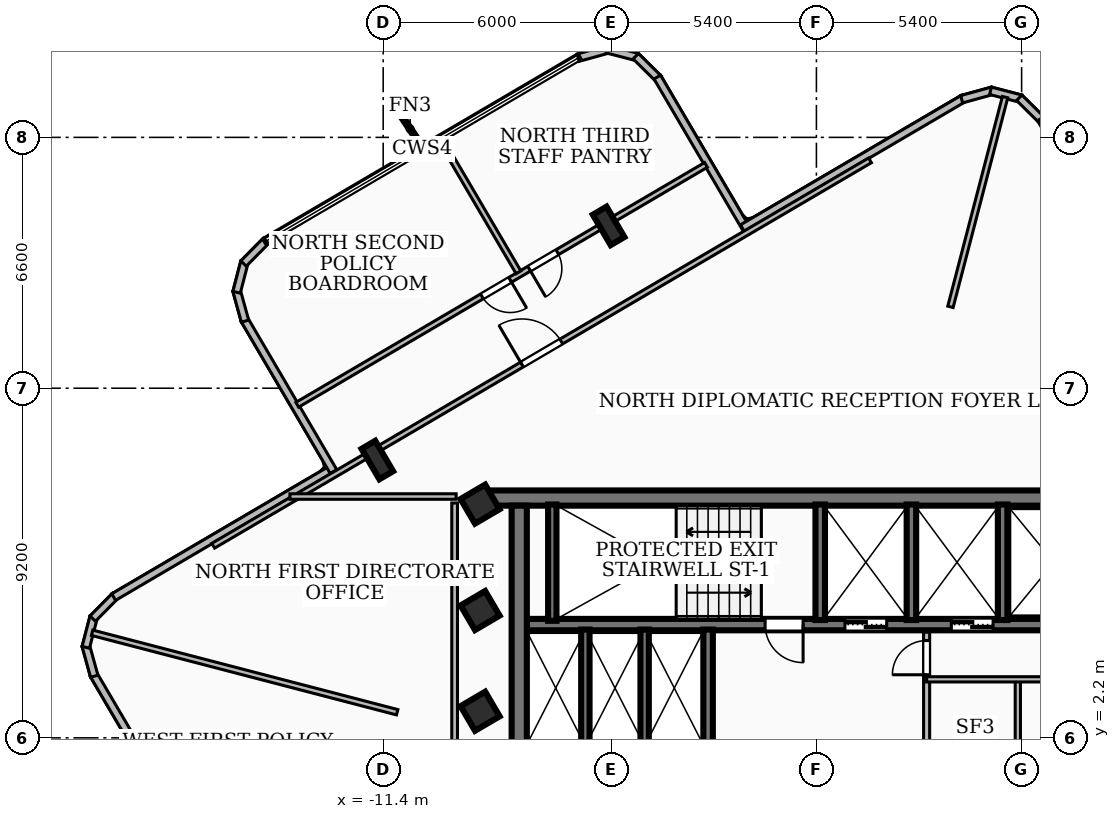
"""IFC4 building model, lengths in metres.
Left out: names, types, materials, properties, quantities, classifications, styles, units other than length and angle.
Written with IfcOpenShell. Run it as: python <this file> out.ifc"""

import sys

from ifc_helpers import new_model, si_unit, direction, frame, frame_2d, origin, origin_2d, place, context, subcontext, project, spatial, rectangle, i_section, extrude, element, fill, save


model = new_model("IFC4")
c1 = context("Model", 3, precision=1e-05, world=origin(), true_north=direction((0.0, 1.0)))
c2 = subcontext(c1, "Body", "Model", "MODEL_VIEW")
j1 = project(units=[si_unit("LENGTHUNIT", "METRE"), si_unit("PLANEANGLEUNIT", "RADIAN")], contexts=[c1])
p1 = place(None, origin())
s1 = spatial("IfcSite", under=j1, at=p1, CompositionType="ELEMENT")
p2 = place(p1, origin())
s2 = spatial("IfcBuilding", under=s1, at=p2, CompositionType="ELEMENT")
p3 = place(p2, frame((0.0, 0.0, 205.2)))
s3 = spatial("IfcBuildingStorey", under=s2, at=p3, CompositionType="ELEMENT", Elevation=205.2)
p4 = place(p3, frame((-8.78, 8.51, 0.0), z_axis=(0.0, 0.0, 1.0), x_axis=(1.0, 0.0, 0.0)))
e1 = element("IfcWall", 1, at=p4, inside=s3, PredefinedType="SHEAR", context=c2, shape_type="SweptSolid", body=[
    extrude(rectangle(XDim=17.56, YDim=0.4, at=frame_2d((8.78, 0.0))), origin(), (0.0, 0.0, 1.0), 3.16),
])
p5 = place(p3, frame((-7.82, 1.95, 0.0), z_axis=(0.0, 0.0, 1.0), x_axis=(0.0, 1.0, 0.0)))
e2 = element("IfcWall", 2, at=p5, inside=s3, PredefinedType="SHEAR", context=c2, shape_type="SweptSolid", body=[
    extrude(rectangle(XDim=6.36, YDim=0.4, at=frame_2d((3.18, 0.0))), origin(), (0.0, 0.0, 1.0), 3.16),
])
p6 = place(p3, frame((7.62, 5.18, 0.0), z_axis=(0.0, 0.0, 1.0), x_axis=(-1.0, 0.0, 0.0)))
e3 = element("IfcWall", 3, at=p6, inside=s3, PredefinedType="SOLIDWALL", context=c2, shape_type="SweptSolid", body=[
    extrude(rectangle(XDim=15.24, YDim=0.3, at=frame_2d((7.62, 0.0))), origin(), (0.0, 0.0, 1.0), 3.16),
])
p7 = place(p6, frame((5.77, 0.0, 0.0)))
e4 = element("IfcOpeningElement", 4, at=p7, cuts=e3, PredefinedType="OPENING", context=c2, shape_type="SweptSolid", body=[
    extrude(rectangle(XDim=1.1, YDim=2.15, at=frame_2d((0.55, 1.075))), frame((0.0, 0.16, 0.0), z_axis=(0.0, -1.0, 0.0), x_axis=(1.0, 0.0, 0.0)), (0.0, 0.0, 1.0), 0.32),
])
p8 = place(p6, frame((2.97, 0.0, 0.0)))
e5 = element("IfcOpeningElement", 5, at=p8, cuts=e3, PredefinedType="OPENING", context=c2, shape_type="SweptSolid", body=[
    extrude(rectangle(XDim=1.1, YDim=2.15, at=frame_2d((0.55, 1.075))), frame((0.0, 0.16, 0.0), z_axis=(0.0, -1.0, 0.0), x_axis=(1.0, 0.0, 0.0)), (0.0, 0.0, 1.0), 0.32),
])
p9 = place(p6, frame((7.97, 0.0, 0.0)))
e6 = element("IfcOpeningElement", 6, at=p9, cuts=e3, PredefinedType="OPENING", context=c2, shape_type="SweptSolid", body=[
    extrude(rectangle(XDim=1.0, YDim=2.1, at=frame_2d((0.5, 1.05))), frame((0.0, 0.16, 0.0), z_axis=(0.0, -1.0, 0.0), x_axis=(1.0, 0.0, 0.0)), (0.0, 0.0, 1.0), 0.32),
])
p10 = place(p3, frame((-6.95, 5.28, 0.0), z_axis=(0.0, 0.0, 1.0), x_axis=(0.0, 1.0, 0.0)))
e7 = element("IfcWall", 7, at=p10, inside=s3, PredefinedType="SOLIDWALL", context=c2, shape_type="SweptSolid", body=[
    extrude(rectangle(XDim=3.06, YDim=0.22, at=frame_2d((1.53, 0.0))), origin(), (0.0, 0.0, 1.0), 3.16),
])
for number, where, z_axis, x_axis in (
    (8, (0.1, 5.3, 0.0), (0.0, 0.0, 1.0), (0.0, 1.0, 0.0)),
    (9, (2.5, 5.3, 0.0), (0.0, 0.0, 1.0), (0.0, 1.0, 0.0)),
    (10, (4.9, 5.3, 0.0), (0.0, 0.0, 1.0), (0.0, 1.0, 0.0)),
):
    element("IfcWall", number, at=place(p3, frame(where, z_axis=z_axis, x_axis=x_axis)), inside=s3, PredefinedType="SOLIDWALL", context=c2, shape_type="SweptSolid", body=[
        extrude(rectangle(XDim=3.04, YDim=0.25, at=frame_2d((1.52, 0.0))), origin(), (0.0, 0.0, 1.0), 3.16),
    ])
p11 = place(p3, frame((-2.85, 1.98, 0.0), z_axis=(0.0, 0.0, 1.0), x_axis=(0.0, 1.0, 0.0)))
e11 = element("IfcWall", 11, at=p11, inside=s3, PredefinedType="SOLIDWALL", context=c2, shape_type="SweptSolid", body=[
    extrude(rectangle(XDim=3.07, YDim=0.25, at=frame_2d((1.535, 0.0))), origin(), (0.0, 0.0, 1.0), 3.16),
])
for number, where, z_axis, x_axis in (
    (12, (-6.08, 1.98, 0.0), (0.0, 0.0, 1.0), (0.0, 1.0, 0.0)),
    (13, (-4.52, 1.98, 0.0), (0.0, 0.0, 1.0), (0.0, 1.0, 0.0)),
):
    element("IfcWall", number, at=place(p3, frame(where, z_axis=z_axis, x_axis=x_axis)), inside=s3, PredefinedType="SOLIDWALL", context=c2, shape_type="SweptSolid", body=[
        extrude(rectangle(XDim=3.07, YDim=0.22, at=frame_2d((1.535, 0.0))), origin(), (0.0, 0.0, 1.0), 3.16),
    ])
for number, where, z_axis, x_axis in (
    (14, (-8.85, 2.9, 0.0), (0.0, 0.0, 1.0), (0.863, 0.506, 0.0)),
    (15, (-8.85, 5.55, 0.0), (0.0, 0.0, 1.0), (0.863, 0.506, 0.0)),
    (16, (-8.85, 8.35, 0.0), (0.0, 0.0, 1.0), (0.863, 0.506, 0.0)),
):
    element("IfcColumn", number, at=place(p3, frame(where, z_axis=z_axis, x_axis=x_axis)), inside=s3, PredefinedType="COLUMN", context=c2, shape_type="SweptSolid", body=[
        extrude(rectangle(XDim=0.75, YDim=0.75, at=origin_2d()), origin(), (0.0, 0.0, 1.0), 3.42),
    ])
for number, where, z_axis, x_axis in (
    (17, (-5.468, 15.671, 0.0), (0.0, 0.0, 1.0), (0.863, 0.506, 0.0)),
    (18, (-11.554, 9.51, 0.0), (0.0, 0.0, 1.0), (0.863, 0.506, 0.0)),
):
    element("IfcColumn", number, at=place(p3, frame(where, z_axis=z_axis, x_axis=x_axis)), inside=s3, PredefinedType="COLUMN", context=c2, shape_type="SweptSolid", body=[
        extrude(i_section(OverallWidth=0.418, OverallDepth=0.927, WebThickness=0.019, FlangeThickness=0.032, at=origin_2d()), origin(), (0.0, 0.0, 1.0), 3.42),
    ])
p12 = place(p3, frame((-5.904, -18.492, 0.0), z_axis=(0.0, 0.0, 1.0), x_axis=(-0.506046465446, 0.862506217258, 0.0)))
e19 = element("IfcWall", 19, at=p12, inside=s3, PredefinedType="SOLIDWALL", context=c2, shape_type="SweptSolid", body=[
    extrude(rectangle(XDim=25.924, YDim=0.2, at=frame_2d((12.962, 0.0))), origin(), (0.0, 0.0, 1.0), 3.16),
])
p13 = place(p12, frame((0.85, 0.0, 0.85)))
e20 = element("IfcOpeningElement", 20, at=p13, cuts=e19, PredefinedType="OPENING", context=c2, shape_type="SweptSolid", body=[
    extrude(rectangle(XDim=1.8, YDim=2.0, at=frame_2d((0.9, 1.0))), frame((0.0, 0.11, 0.0), z_axis=(0.0, -1.0, 0.0), x_axis=(1.0, 0.0, 0.0)), (0.0, 0.0, 1.0), 0.22),
])
p14 = place(p3, frame((-19.003, 3.822, 0.0), z_axis=(0.0, 0.0, 1.0), x_axis=(-0.266246353668, 0.963905015631, 0.0)))
e21 = element("IfcWall", 21, at=p14, inside=s3, PredefinedType="SOLIDWALL", context=c2, shape_type="SweptSolid", body=[
    extrude(rectangle(XDim=0.838, YDim=0.2, at=frame_2d((0.419, 0.0))), origin(), (0.0, 0.0, 1.0), 3.16),
])
p15 = place(p3, frame((-19.225, 4.582, 0.0), z_axis=(0.0, 0.0, 1.0), x_axis=(0.251167733737, 0.967943577658, 0.0)))
e22 = element("IfcWall", 22, at=p15, inside=s3, PredefinedType="SOLIDWALL", context=c2, shape_type="SweptSolid", body=[
    extrude(rectangle(XDim=0.824, YDim=0.2, at=frame_2d((0.412, 0.0))), origin(), (0.0, 0.0, 1.0), 3.16),
])
p16 = place(p3, frame((-19.042, 5.338, 0.0), z_axis=(0.0, 0.0, 1.0), x_axis=(0.702877524881, 0.711310891957, 0.0)))
e23 = element("IfcWall", 23, at=p16, inside=s3, PredefinedType="SOLIDWALL", context=c2, shape_type="SweptSolid", body=[
    extrude(rectangle(XDim=0.84, YDim=0.2, at=frame_2d((0.42, 0.0))), origin(), (0.0, 0.0, 1.0), 3.16),
])
p17 = place(p3, frame((-18.492, 5.904, 0.0), z_axis=(0.0, 0.0, 1.0), x_axis=(0.86245977502, 0.506125613333, 0.0)))
e24 = element("IfcWall", 24, at=p17, inside=s3, PredefinedType="SOLIDWALL", context=c2, shape_type="SweptSolid", body=[
    extrude(rectangle(XDim=6.741, YDim=0.2, at=frame_2d((3.371, 0.0))), origin(), (0.0, 0.0, 1.0), 3.16),
])
p18 = place(p3, frame((-12.707, 9.207, 0.0), z_axis=(0.0, 0.0, 1.0), x_axis=(-0.505936854923, 0.862570518178, 0.0)))
e25 = element("IfcWall", 25, at=p18, inside=s3, PredefinedType="SOLIDWALL", context=c2, shape_type="SweptSolid", body=[
    extrude(rectangle(XDim=4.641, YDim=0.2, at=frame_2d((2.32, 0.0))), origin(), (0.0, 0.0, 1.0), 3.16),
])
p19 = place(p3, frame((-15.035, 13.164, 0.0), z_axis=(0.0, 0.0, 1.0), x_axis=(-0.266246353668, 0.963905015631, 0.0)))
e26 = element("IfcWall", 26, at=p19, inside=s3, PredefinedType="SOLIDWALL", context=c2, shape_type="SweptSolid", body=[
    extrude(rectangle(XDim=0.838, YDim=0.2, at=frame_2d((0.419, 0.0))), origin(), (0.0, 0.0, 1.0), 3.16),
])
p20 = place(p3, frame((-15.257, 13.924, 0.0), z_axis=(0.0, 0.0, 1.0), x_axis=(0.251167733737, 0.967943577658, 0.0)))
e27 = element("IfcWall", 27, at=p20, inside=s3, PredefinedType="SOLIDWALL", context=c2, shape_type="SweptSolid", body=[
    extrude(rectangle(XDim=0.824, YDim=0.2, at=frame_2d((0.412, 0.0))), origin(), (0.0, 0.0, 1.0), 3.16),
])
p21 = place(p3, frame((-15.074, 14.68, 0.0), z_axis=(0.0, 0.0, 1.0), x_axis=(0.702877524881, 0.711310891957, 0.0)))
e28 = element("IfcWall", 28, at=p21, inside=s3, PredefinedType="SOLIDWALL", context=c2, shape_type="SweptSolid", body=[
    extrude(rectangle(XDim=0.84, YDim=0.2, at=frame_2d((0.42, 0.0))), origin(), (0.0, 0.0, 1.0), 3.16),
])
p22 = place(p3, frame((-6.269, 20.097, 0.0), z_axis=(0.0, 0.0, 1.0), x_axis=(0.963925656212, 0.266171616247, 0.0)))
e29 = element("IfcWall", 29, at=p22, inside=s3, PredefinedType="SOLIDWALL", context=c2, shape_type="SweptSolid", body=[
    extrude(rectangle(XDim=0.838, YDim=0.2, at=frame_2d((0.419, 0.0))), origin(), (0.0, 0.0, 1.0), 3.16),
])
p23 = place(p3, frame((-5.509, 20.319, 0.0), z_axis=(0.0, 0.0, 1.0), x_axis=(0.967962254737, -0.251095745493, 0.0)))
e30 = element("IfcWall", 30, at=p23, inside=s3, PredefinedType="SOLIDWALL", context=c2, shape_type="SweptSolid", body=[
    extrude(rectangle(XDim=0.824, YDim=0.2, at=frame_2d((0.412, 0.0))), origin(), (0.0, 0.0, 1.0), 3.16),
])
p24 = place(p3, frame((-4.753, 20.136, 0.0), z_axis=(0.0, 0.0, 1.0), x_axis=(0.711167178618, -0.70302293281, 0.0)))
e31 = element("IfcWall", 31, at=p24, inside=s3, PredefinedType="SOLIDWALL", context=c2, shape_type="SweptSolid", body=[
    extrude(rectangle(XDim=0.839, YDim=0.2, at=frame_2d((0.42, 0.0))), origin(), (0.0, 0.0, 1.0), 3.16),
])
p25 = place(p3, frame((-4.187, 19.586, 0.0), z_axis=(0.0, 0.0, 1.0), x_axis=(0.505936854923, -0.862570518178, 0.0)))
e32 = element("IfcWall", 32, at=p25, inside=s3, PredefinedType="SOLIDWALL", context=c2, shape_type="SweptSolid", body=[
    extrude(rectangle(XDim=4.641, YDim=0.2, at=frame_2d((2.32, 0.0))), origin(), (0.0, 0.0, 1.0), 3.16),
])
p26 = place(p3, frame((-1.948, 15.612, 0.0), z_axis=(0.0, 0.0, 1.0), x_axis=(0.86259717351, 0.505891407569, 0.0)))
e33 = element("IfcWall", 33, at=p26, inside=s3, PredefinedType="SOLIDWALL", context=c2, shape_type="SweptSolid", body=[
    extrude(rectangle(XDim=6.742, YDim=0.2, at=frame_2d((3.371, 0.0))), origin(), (0.0, 0.0, 1.0), 3.16),
])
p27 = place(p3, frame((3.822, 19.003, 0.0), z_axis=(0.0, 0.0, 1.0), x_axis=(0.963905015631, 0.266246353668, 0.0)))
e34 = element("IfcWall", 34, at=p27, inside=s3, PredefinedType="SOLIDWALL", context=c2, shape_type="SweptSolid", body=[
    extrude(rectangle(XDim=0.838, YDim=0.2, at=frame_2d((0.419, 0.0))), origin(), (0.0, 0.0, 1.0), 3.16),
])
p28 = place(p3, frame((4.582, 19.225, 0.0), z_axis=(0.0, 0.0, 1.0), x_axis=(0.967943577658, -0.251167733737, 0.0)))
e35 = element("IfcWall", 35, at=p28, inside=s3, PredefinedType="SOLIDWALL", context=c2, shape_type="SweptSolid", body=[
    extrude(rectangle(XDim=0.824, YDim=0.2, at=frame_2d((0.412, 0.0))), origin(), (0.0, 0.0, 1.0), 3.16),
])
p29 = place(p3, frame((5.338, 19.042, 0.0), z_axis=(0.0, 0.0, 1.0), x_axis=(0.711310891957, -0.702877524881, 0.0)))
e36 = element("IfcWall", 36, at=p29, inside=s3, PredefinedType="SOLIDWALL", context=c2, shape_type="SweptSolid", body=[
    extrude(rectangle(XDim=0.84, YDim=0.2, at=frame_2d((0.42, 0.0))), origin(), (0.0, 0.0, 1.0), 3.16),
])
p30 = place(p3, frame((5.904, 18.492, 0.0), z_axis=(0.0, 0.0, 1.0), x_axis=(0.506017844805, -0.862523008817, 0.0)))
e37 = element("IfcWall", 37, at=p30, inside=s3, PredefinedType="SOLIDWALL", context=c2, shape_type="SweptSolid", body=[
    extrude(rectangle(XDim=6.741, YDim=0.2, at=frame_2d((3.37, 0.0))), origin(), (0.0, 0.0, 1.0), 3.16),
])
p31 = place(p3, frame((2.9, 2.04, 0.0), z_axis=(0.0, 0.0, 1.0), x_axis=(0.0, 1.0, 0.0)))
e38 = element("IfcWall", 38, at=p31, inside=s3, PredefinedType="PARTITIONING", context=c2, shape_type="SweptSolid", body=[
    extrude(rectangle(XDim=2.94, YDim=0.16, at=frame_2d((1.47, 0.0))), origin(), (0.0, 0.0, 1.0), 2.39),
])
p32 = place(p31, frame((1.82, 0.0, 0.0)))
e39 = element("IfcOpeningElement", 39, at=p32, cuts=e38, PredefinedType="OPENING", context=c2, shape_type="SweptSolid", body=[
    extrude(rectangle(XDim=0.9, YDim=2.06, at=frame_2d((0.45, 1.03))), frame((0.0, 0.09, 0.0), z_axis=(0.0, -1.0, 0.0), x_axis=(1.0, 0.0, 0.0)), (0.0, 0.0, 1.0), 0.18),
])
p33 = place(p3, frame((2.9, 3.74, 0.0), z_axis=(0.0, 0.0, 1.0), x_axis=(1.0, 0.0, 0.0)))
e40 = element("IfcWall", 40, at=p33, inside=s3, PredefinedType="PARTITIONING", context=c2, shape_type="SweptSolid", body=[
    extrude(rectangle(XDim=4.65, YDim=0.138, at=frame_2d((2.325, 0.0))), origin(), (0.0, 0.0, 1.0), 3.16),
])
p34 = place(p3, frame((5.3, 1.85, 0.0), z_axis=(0.0, 0.0, 1.0), x_axis=(0.0, 1.0, 0.0)))
e41 = element("IfcWall", 41, at=p34, inside=s3, PredefinedType="PARTITIONING", context=c2, shape_type="SweptSolid", body=[
    extrude(rectangle(XDim=1.89, YDim=0.138, at=frame_2d((0.945, 0.0))), origin(), (0.0, 0.0, 1.0), 2.39),
])
p35 = place(p3, frame((-9.52, 1.75, 0.0), z_axis=(0.0, 0.0, 1.0), x_axis=(0.0, 1.0, 0.0)))
e42 = element("IfcWall", 42, at=p35, inside=s3, PredefinedType="PARTITIONING", context=c2, shape_type="SweptSolid", body=[
    extrude(rectangle(XDim=6.63, YDim=0.15, at=frame_2d((3.315, 0.0))), origin(), (0.0, 0.0, 1.0), 3.16),
])
p36 = place(p3, frame((-13.854, 8.55, 0.0), z_axis=(0.0, 0.0, 1.0), x_axis=(1.0, 0.0, 0.0)))
e43 = element("IfcWall", 43, at=p36, inside=s3, PredefinedType="PARTITIONING", context=c2, shape_type="SweptSolid", body=[
    extrude(rectangle(XDim=4.374, YDim=0.145, at=frame_2d((2.187, 0.0))), origin(), (0.0, 0.0, 1.0), 2.53),
])
p37 = place(p3, frame((3.527, 13.54, 0.0), z_axis=(0.0, 0.0, 1.0), x_axis=(0.252132617321, 0.967692690519, 0.0)))
e44 = element("IfcWall", 44, at=p37, inside=s3, PredefinedType="PARTITIONING", context=c2, shape_type="SweptSolid", body=[
    extrude(rectangle(XDim=5.703, YDim=0.145, at=frame_2d((2.852, 0.0))), origin(), (0.0, 0.0, 1.0), 3.16),
])
p38 = place(p3, frame((-11.032, 2.874, 0.0), z_axis=(0.0, 0.0, 1.0), x_axis=(-0.967704417597, 0.252087604146, 0.0)))
e45 = element("IfcWall", 45, at=p38, inside=s3, PredefinedType="PARTITIONING", context=c2, shape_type="SweptSolid", body=[
    extrude(rectangle(XDim=8.295, YDim=0.145, at=frame_2d((4.147, 0.0))), origin(), (0.0, 0.0, 1.0), 3.16),
])
p39 = place(p3, frame((-15.873, 7.255, 0.0), z_axis=(0.0, 0.0, 1.0), x_axis=(0.862498672631, 0.506059324299, 0.0)))
e46 = element("IfcWall", 46, at=p39, inside=s3, PredefinedType="PARTITIONING", context=c2, shape_type="SweptSolid", body=[
    extrude(rectangle(XDim=20.039, YDim=0.145, at=frame_2d((10.02, 0.0))), origin(), (0.0, 0.0, 1.0), 2.53),
])
p40 = place(p39, frame((9.42, 0.0, 0.0)))
e47 = element("IfcOpeningElement", 47, at=p40, cuts=e46, PredefinedType="OPENING", context=c2, shape_type="SweptSolid", body=[
    extrude(rectangle(XDim=1.2, YDim=2.1, at=frame_2d((0.6, 1.05))), frame((0.0, 0.083, 0.0), z_axis=(0.0, -1.0, 0.0), x_axis=(1.0, 0.0, 0.0)), (0.0, 0.0, 1.0), 0.165),
])
p41 = place(p3, frame((-7.84, 14.449, 0.0), z_axis=(0.0, 0.0, 1.0), x_axis=(-0.505991637753, 0.862538383218, 0.0)))
e48 = element("IfcWall", 48, at=p41, inside=s3, PredefinedType="PARTITIONING", context=c2, shape_type="SweptSolid", body=[
    extrude(rectangle(XDim=4.006, YDim=0.145, at=frame_2d((2.003, 0.0))), origin(), (0.0, 0.0, 1.0), 3.16),
])
p42 = place(p3, frame((-2.906, 17.275, 0.0), z_axis=(0.0, 0.0, 1.0), x_axis=(-0.862505879614, -0.506047040927, 0.0)))
e49 = element("IfcWall", 49, at=p42, inside=s3, PredefinedType="PARTITIONING", context=c2, shape_type="SweptSolid", body=[
    extrude(rectangle(XDim=12.471, YDim=0.145, at=frame_2d((6.235, 0.0))), origin(), (0.0, 0.0, 1.0), 2.53),
])
p43 = place(p42, frame((4.535, 0.0, 0.0)))
e50 = element("IfcOpeningElement", 50, at=p43, cuts=e49, PredefinedType="OPENING", context=c2, shape_type="SweptSolid", body=[
    extrude(rectangle(XDim=0.86, YDim=2.04, at=frame_2d((0.43, 1.02))), frame((0.0, 0.083, 0.0), z_axis=(0.0, -1.0, 0.0), x_axis=(1.0, 0.0, 0.0)), (0.0, 0.0, 1.0), 0.165),
])
p44 = place(p42, frame((5.975, 0.0, 0.0)))
e51 = element("IfcOpeningElement", 51, at=p44, cuts=e49, PredefinedType="OPENING", context=c2, shape_type="SweptSolid", body=[
    extrude(rectangle(XDim=0.86, YDim=2.04, at=frame_2d((0.43, 1.02))), frame((0.0, 0.083, 0.0), z_axis=(0.0, -1.0, 0.0), x_axis=(1.0, 0.0, 0.0)), (0.0, 0.0, 1.0), 0.165),
])
p45 = place(p7, origin())
e52 = element("IfcDoor", 52, at=p45, inside=s3, OperationType="DOUBLE_DOOR_SLIDING", PredefinedType="DOOR", context=c2, shape_type="SweptSolid", body=[
    extrude(rectangle(XDim=1.1, YDim=2.15, at=frame_2d((0.55, 1.075))), frame((0.0, 0.025, 0.0), z_axis=(0.0, -1.0, 0.0), x_axis=(1.0, 0.0, 0.0)), (0.0, 0.0, 1.0), 0.05),
])
fill(e4, e52)
p46 = place(p8, origin())
e53 = element("IfcDoor", 53, at=p46, inside=s3, OperationType="DOUBLE_DOOR_SLIDING", PredefinedType="DOOR", context=c2, shape_type="SweptSolid", body=[
    extrude(rectangle(XDim=1.1, YDim=2.15, at=frame_2d((0.55, 1.075))), frame((0.0, 0.025, 0.0), z_axis=(0.0, -1.0, 0.0), x_axis=(1.0, 0.0, 0.0)), (0.0, 0.0, 1.0), 0.05),
])
fill(e5, e53)
p47 = place(p9, origin())
e54 = element("IfcDoor", 54, at=p47, inside=s3, OperationType="SINGLE_SWING_LEFT", PredefinedType="DOOR", context=c2, shape_type="SweptSolid", body=[
    extrude(rectangle(XDim=1.0, YDim=2.1, at=frame_2d((0.5, 1.05))), frame((0.0, 0.025, 0.0), z_axis=(0.0, -1.0, 0.0), x_axis=(1.0, 0.0, 0.0)), (0.0, 0.0, 1.0), 0.05),
])
fill(e6, e54)
p48 = place(p32, origin())
e55 = element("IfcDoor", 55, at=p48, inside=s3, OperationType="SINGLE_SWING_LEFT", PredefinedType="DOOR", context=c2, shape_type="SweptSolid", body=[
    extrude(rectangle(XDim=0.9, YDim=2.06, at=frame_2d((0.45, 1.03))), frame((0.0, 0.025, 0.0), z_axis=(0.0, -1.0, 0.0), x_axis=(1.0, 0.0, 0.0)), (0.0, 0.0, 1.0), 0.05),
])
fill(e39, e55)
p49 = place(p40, origin())
e56 = element("IfcDoor", 56, at=p49, inside=s3, OperationType="SINGLE_SWING_LEFT", PredefinedType="DOOR", context=c2, shape_type="SweptSolid", body=[
    extrude(rectangle(XDim=1.2, YDim=2.1, at=frame_2d((0.6, 1.05))), frame((0.0, 0.025, 0.0), z_axis=(0.0, -1.0, 0.0), x_axis=(1.0, 0.0, 0.0)), (0.0, 0.0, 1.0), 0.05),
])
fill(e47, e56)
p50 = place(p43, origin())
e57 = element("IfcDoor", 57, at=p50, inside=s3, OperationType="SINGLE_SWING_RIGHT", PredefinedType="DOOR", context=c2, shape_type="SweptSolid", body=[
    extrude(rectangle(XDim=0.86, YDim=2.04, at=frame_2d((0.43, 1.02))), frame((0.0, 0.025, 0.0), z_axis=(0.0, -1.0, 0.0), x_axis=(1.0, 0.0, 0.0)), (0.0, 0.0, 1.0), 0.05),
])
fill(e50, e57)
p51 = place(p44, origin())
e58 = element("IfcDoor", 58, at=p51, inside=s3, OperationType="SINGLE_SWING_LEFT", PredefinedType="DOOR", context=c2, shape_type="SweptSolid", body=[
    extrude(rectangle(XDim=0.86, YDim=2.04, at=frame_2d((0.43, 1.02))), frame((0.0, 0.025, 0.0), z_axis=(0.0, -1.0, 0.0), x_axis=(1.0, 0.0, 0.0)), (0.0, 0.0, 1.0), 0.05),
])
fill(e51, e58)
save(model, sys.argv[1])
